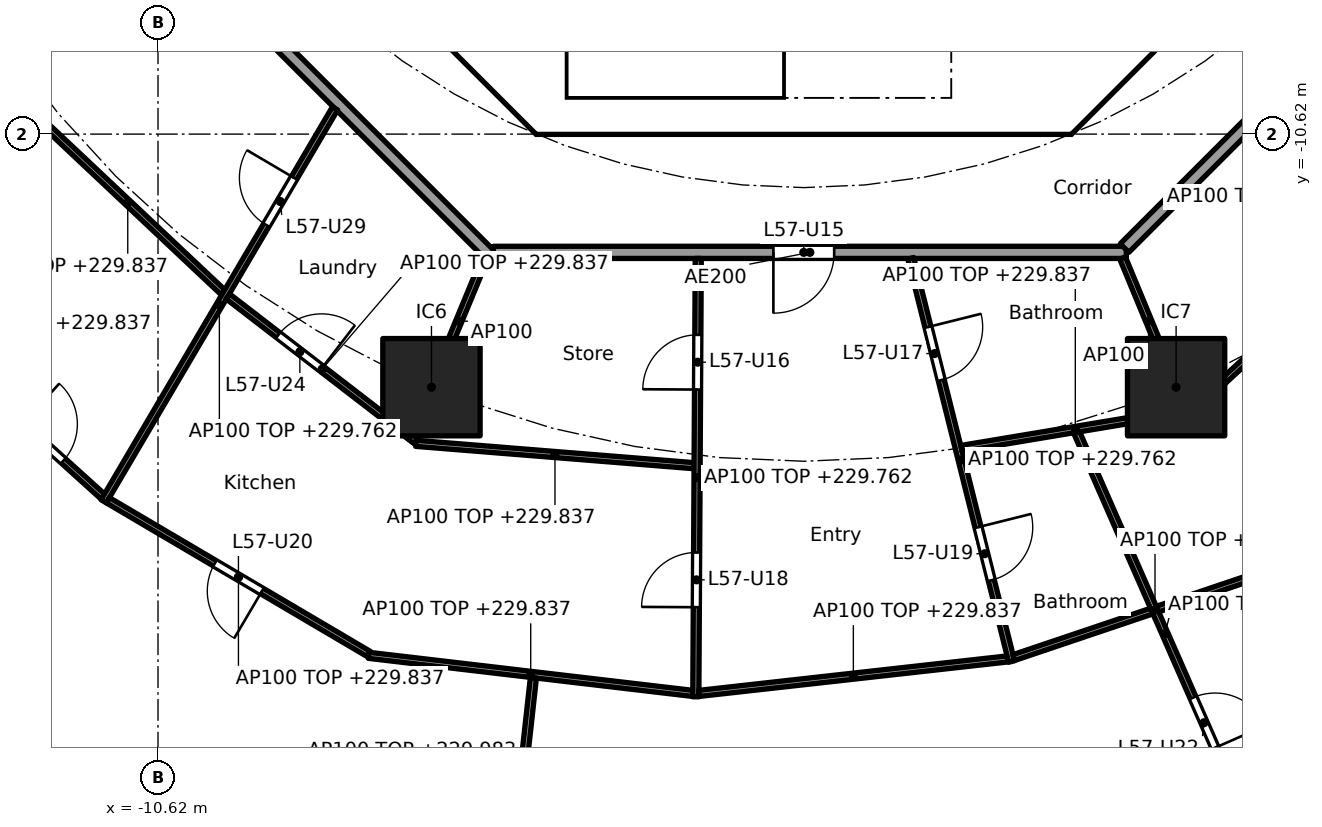
"""IFC4 building model, lengths in metres.
Left out: names, types, materials, properties, quantities, classifications, styles, units other than length and angle.
Written with IfcOpenShell. Run it as: python <this file> out.ifc"""

import sys

from ifc_helpers import new_model, si_unit, direction, frame, frame_2d, origin, origin_2d, place, context, subcontext, project, spatial, polyline, rectangle, outline, extrude, element, fill, save


model = new_model("IFC4")
c1 = context("Model", 3, precision=1e-05, world=origin(), true_north=direction((0.0, 1.0)))
c2 = subcontext(c1, "Body", "Model", "MODEL_VIEW")
j1 = project(units=[si_unit("LENGTHUNIT", "METRE"), si_unit("PLANEANGLEUNIT", "RADIAN")], contexts=[c1])
p1 = place(None, origin())
s1 = spatial("IfcSite", under=j1, at=p1, CompositionType="ELEMENT")
p2 = place(p1, origin())
s2 = spatial("IfcBuilding", under=s1, at=p2, CompositionType="ELEMENT")
p3 = place(p2, frame((0.0, 0.0, 227.0)))
s3 = spatial("IfcBuildingStorey", under=s2, at=p3, CompositionType="ELEMENT", Elevation=227.0)
for number, where, z_axis, x_axis in (
    (1, (-6.123, -14.782, 0.0), (0.0, 0.0, 1.0), (1.0, 0.0, 0.0)),
    (2, (6.123, -14.782, 0.0), (0.0, 0.0, 1.0), (1.0, 0.0, 0.0)),
):
    element("IfcColumn", number, at=place(p3, frame(where, z_axis=z_axis, x_axis=x_axis)), inside=s3, PredefinedType="COLUMN", context=c2, shape_type="SweptSolid", body=[
        extrude(rectangle(XDim=1.6, YDim=1.6, at=origin_2d()), origin(), (0.0, 0.0, 1.0), 3.7),
    ])
p4 = place(p3, frame((-9.988, -4.613, 0.0), z_axis=(0.0, 0.0, 1.0), x_axis=(0.707106781187, -0.707106781187, 0.0)))
e3 = element("IfcWall", 3, at=p4, inside=s3, PredefinedType="SHEAR", context=c2, shape_type="SweptSolid", body=[
    extrude(rectangle(XDim=7.602, YDim=0.6, at=frame_2d((3.801, 0.0))), origin(), (0.0, 0.0, 1.0), 3.44),
])
p5 = place(p4, frame((6.151, 0.0, 0.0)))
e4 = element("IfcOpeningElement", 4, at=p5, cuts=e3, PredefinedType="OPENING", context=c2, shape_type="SweptSolid", body=[
    extrude(rectangle(XDim=1.1, YDim=2.1, at=frame_2d((0.55, 1.05))), frame((0.0, 0.31, 0.0), z_axis=(0.0, -1.0, 0.0), x_axis=(1.0, 0.0, 0.0)), (0.0, 0.0, 1.0), 0.62),
])
p6 = place(p3, frame((4.613, -9.988, 0.0), z_axis=(0.0, 0.0, 1.0), x_axis=(0.707106781187, 0.707106781187, 0.0)))
e5 = element("IfcWall", 5, at=p6, inside=s3, PredefinedType="SHEAR", context=c2, shape_type="SweptSolid", body=[
    extrude(rectangle(XDim=7.602, YDim=0.6, at=frame_2d((3.801, 0.0))), origin(), (0.0, 0.0, 1.0), 3.44),
])
p7 = place(p6, frame((3.201, 0.0, 0.0)))
e6 = element("IfcOpeningElement", 6, at=p7, cuts=e5, PredefinedType="OPENING", context=c2, shape_type="SweptSolid", body=[
    extrude(rectangle(XDim=1.2, YDim=2.1, at=frame_2d((0.6, 1.05))), frame((0.0, 0.31, 0.0), z_axis=(0.0, -1.0, 0.0), x_axis=(1.0, 0.0, 0.0)), (0.0, 0.0, 1.0), 0.62),
])
p8 = place(p3, frame((4.0, -10.025, 0.0), z_axis=(0.0, 0.0, 1.0), x_axis=(0.0, 1.0, 0.0)))
e7 = element("IfcWall", 7, at=p8, inside=s3, PredefinedType="SOLIDWALL", context=c2, shape_type="SweptSolid", body=[
    extrude(rectangle(XDim=3.0, YDim=0.2, at=frame_2d((1.5, 0.0))), origin(), (0.0, 0.0, 1.0), 3.44),
])
p9 = place(p8, frame((0.975, 0.0, 0.0)))
e8 = element("IfcOpeningElement", 8, at=p9, cuts=e7, PredefinedType="OPENING", context=c2, shape_type="SweptSolid", body=[
    extrude(rectangle(XDim=1.1, YDim=2.1, at=frame_2d((0.55, 1.05))), frame((0.0, 0.11, 0.0), z_axis=(0.0, -1.0, 0.0), x_axis=(1.0, 0.0, 0.0)), (0.0, 0.0, 1.0), 0.22),
])
p10 = place(p3, origin())
e9 = element("IfcWall", 9, at=p10, inside=s3, PredefinedType="SHEAR", context=c2, shape_type="SweptSolid", body=[
    extrude(outline(polyline([(-4.152, -10.025), (4.152, -10.025), (4.401, -9.776), (4.825, -10.2), (4.401, -10.625), (-4.401, -10.625), (-4.825, -10.2), (-4.401, -9.776), (-4.152, -10.025)])), origin(), (0.0, 0.0, 1.0), 3.44),
])
p11 = place(p3, origin())
e10 = element("IfcWall", 10, at=p11, inside=s3, PredefinedType="SOLIDWALL", context=c2, shape_type="SweptSolid", body=[
    extrude(outline(polyline([(-3.9, -10.025), (-4.1, -10.025), (-4.1, -7.025), (-3.9, -7.025), (-3.9, -10.025)])), origin(), (0.0, 0.0, 1.0), 3.44),
])
p12 = place(p3, frame((-12.635, -5.134, 0.0), z_axis=(0.0, 0.0, 1.0), x_axis=(0.707106781187, -0.707106781187, 0.0)))
e11 = element("IfcWall", 11, at=p12, inside=s3, PredefinedType="PARTITIONING", context=c2, shape_type="SweptSolid", body=[
    extrude(rectangle(XDim=10.609, YDim=0.2, at=frame_2d((5.305, 0.0))), origin(), (0.0, 0.0, 1.0), 3.44),
])
p13 = place(p3, frame((-5.104, -12.565, 0.0), z_axis=(0.0, 0.0, 1.0), x_axis=(1.0, 0.0, 0.0)))
e12 = element("IfcWall", 12, at=p13, inside=s3, PredefinedType="PARTITIONING", context=c2, shape_type="SweptSolid", body=[
    extrude(rectangle(XDim=10.409, YDim=0.2, at=frame_2d((5.205, 0.0))), origin(), (0.0, 0.0, 1.0), 3.44),
])
p14 = place(p13, frame((4.604, 0.0, 0.0)))
e13 = element("IfcOpeningElement", 13, at=p14, cuts=e12, PredefinedType="OPENING", context=c2, shape_type="SweptSolid", body=[
    extrude(rectangle(XDim=1.0, YDim=2.1, at=frame_2d((0.5, 1.05))), frame((0.0, 0.11, 0.0), z_axis=(0.0, -1.0, 0.0), x_axis=(1.0, 0.0, 0.0)), (0.0, 0.0, 1.0), 0.22),
])
p15 = place(p3, frame((5.275, -12.494, 0.0), z_axis=(0.0, 0.0, 1.0), x_axis=(0.707106781187, 0.707106781187, 0.0)))
e14 = element("IfcWall", 14, at=p15, inside=s3, PredefinedType="PARTITIONING", context=c2, shape_type="SweptSolid", body=[
    extrude(rectangle(XDim=10.409, YDim=0.2, at=frame_2d((5.205, 0.0))), origin(), (0.0, 0.0, 1.0), 3.44),
])
p16 = place(p3, frame((-12.688, -10.27, 0.0), z_axis=(0.0, 0.0, 1.0), x_axis=(0.728268142903, -0.685292282192, 0.0)))
e15 = element("IfcWall", 15, at=p16, inside=s3, PredefinedType="PARTITIONING", context=c2, shape_type="SweptSolid", body=[
    extrude(rectangle(XDim=4.312, YDim=0.1, at=frame_2d((2.156, 0.0))), origin(), (0.0, 0.0, 1.0), 2.837),
])
p17 = place(p3, frame((-15.474, -13.019, 0.0), z_axis=(0.0, 0.0, 1.0), x_axis=(0.742348572616, -0.670013878017, 0.0)))
e16 = element("IfcWall", 16, at=p17, inside=s3, PredefinedType="PARTITIONING", context=c2, shape_type="SweptSolid", body=[
    extrude(rectangle(XDim=5.319, YDim=0.1, at=frame_2d((2.66, 0.0))), origin(), (0.0, 0.0, 1.0), 2.837),
])
p18 = place(p17, frame((3.54, 0.0, 0.0)))
e17 = element("IfcOpeningElement", 17, at=p18, cuts=e16, PredefinedType="OPENING", context=c2, shape_type="SweptSolid", body=[
    extrude(rectangle(XDim=0.9, YDim=2.1, at=frame_2d((0.45, 1.05))), frame((0.0, 0.06, 0.0), z_axis=(0.0, -1.0, 0.0), x_axis=(1.0, 0.0, 0.0)), (0.0, 0.0, 1.0), 0.12),
])
p19 = place(p3, frame((-7.709, -10.198, 0.0), z_axis=(0.0, 0.0, 1.0), x_axis=(-0.507362999545, -0.861732433353, 0.0)))
e18 = element("IfcWall", 18, at=p19, inside=s3, PredefinedType="PARTITIONING", context=c2, shape_type="SweptSolid", body=[
    extrude(rectangle(XDim=7.499, YDim=0.1, at=frame_2d((3.749, 0.0))), origin(), (0.0, 0.0, 1.0), 2.762),
])
p20 = place(p19, frame((1.326, 0.0, 0.0)))
e19 = element("IfcOpeningElement", 19, at=p20, cuts=e18, PredefinedType="OPENING", context=c2, shape_type="SweptSolid", body=[
    extrude(rectangle(XDim=0.9, YDim=2.1, at=frame_2d((0.45, 1.05))), frame((0.0, 0.06, 0.0), z_axis=(0.0, -1.0, 0.0), x_axis=(1.0, 0.0, 0.0)), (0.0, 0.0, 1.0), 0.12),
])
p21 = place(p3, frame((-9.471, -13.289, 0.0), z_axis=(0.0, 0.0, 1.0), x_axis=(0.7922205419, -0.61023488346, 0.0)))
e20 = element("IfcWall", 20, at=p21, inside=s3, PredefinedType="PARTITIONING", context=c2, shape_type="SweptSolid", body=[
    extrude(rectangle(XDim=3.916, YDim=0.1, at=frame_2d((1.958, 0.0))), origin(), (0.0, 0.0, 1.0), 2.837),
])
p22 = place(p21, frame((1.045, 0.0, 0.0)))
e21 = element("IfcOpeningElement", 21, at=p22, cuts=e20, PredefinedType="OPENING", context=c2, shape_type="SweptSolid", body=[
    extrude(rectangle(XDim=0.9, YDim=2.1, at=frame_2d((0.45, 1.05))), frame((0.0, 0.06, 0.0), z_axis=(0.0, -1.0, 0.0), x_axis=(1.0, 0.0, 0.0)), (0.0, 0.0, 1.0), 0.12),
])
p23 = place(p3, frame((-11.445, -16.641, 0.0), z_axis=(0.0, 0.0, 1.0), x_axis=(0.861562560957, -0.507651409489, 0.0)))
e22 = element("IfcWall", 22, at=p23, inside=s3, PredefinedType="PARTITIONING", context=c2, shape_type="SweptSolid", body=[
    extrude(rectangle(XDim=4.985, YDim=0.1, at=frame_2d((2.492, 0.0))), origin(), (0.0, 0.0, 1.0), 2.837),
])
p24 = place(p23, frame((2.042, 0.0, 0.0)))
e23 = element("IfcOpeningElement", 23, at=p24, cuts=e22, PredefinedType="OPENING", context=c2, shape_type="SweptSolid", body=[
    extrude(rectangle(XDim=0.9, YDim=2.1, at=frame_2d((0.45, 1.05))), frame((0.0, 0.06, 0.0), z_axis=(0.0, -1.0, 0.0), x_axis=(1.0, 0.0, 0.0)), (0.0, 0.0, 1.0), 0.12),
])
p25 = place(p3, frame((-5.243, -12.657, 0.0), z_axis=(0.0, 0.0, 1.0), x_axis=(-0.382719158442, -0.923864733477, 0.0)))
e24 = element("IfcWall", 24, at=p25, inside=s3, PredefinedType="PARTITIONING", context=c2, shape_type="SweptSolid", body=[
    extrude(rectangle(XDim=2.25, YDim=0.1, at=frame_2d((1.125, 0.0))), origin(), (0.0, 0.0, 1.0), 3.44),
])
p26 = place(p3, frame((-6.379, -15.705, 0.0), z_axis=(0.0, 0.0, 1.0), x_axis=(0.996786462227, -0.080104611105, 0.0)))
e25 = element("IfcWall", 25, at=p26, inside=s3, PredefinedType="PARTITIONING", context=c2, shape_type="SweptSolid", body=[
    extrude(rectangle(XDim=4.59, YDim=0.1, at=frame_2d((2.295, 0.0))), origin(), (0.0, 0.0, 1.0), 2.837),
])
p27 = place(p3, frame((-7.156, -19.191, 0.0), z_axis=(0.0, 0.0, 1.0), x_axis=(0.993172627718, -0.116653896424, 0.0)))
e26 = element("IfcWall", 26, at=p27, inside=s3, PredefinedType="PARTITIONING", context=c2, shape_type="SweptSolid", body=[
    extrude(rectangle(XDim=5.368, YDim=0.1, at=frame_2d((2.684, 0.0))), origin(), (0.0, 0.0, 1.0), 2.837),
])
p28 = place(p3, frame((-4.447, -19.56, 0.0), z_axis=(0.0, 0.0, 1.0), x_axis=(-0.109897425445, -0.993942933915, 0.0)))
e27 = element("IfcWall", 27, at=p28, inside=s3, PredefinedType="PARTITIONING", context=c2, shape_type="SweptSolid", body=[
    extrude(rectangle(XDim=4.465, YDim=0.1, at=frame_2d((2.233, 0.0))), origin(), (0.0, 0.0, 1.0), 2.983),
])
p29 = place(p28, frame((1.783, 0.0, 0.0)))
e28 = element("IfcOpeningElement", 28, at=p29, cuts=e27, PredefinedType="OPENING", context=c2, shape_type="SweptSolid", body=[
    extrude(rectangle(XDim=0.9, YDim=2.1, at=frame_2d((0.45, 1.05))), frame((0.0, 0.06, 0.0), z_axis=(0.0, -1.0, 0.0), x_axis=(1.0, 0.0, 0.0)), (0.0, 0.0, 1.0), 0.12),
])
p30 = place(p3, frame((-1.735, -12.665, 0.0), z_axis=(0.0, 0.0, 1.0), x_axis=(-0.005554152823, -0.999984575574, 0.0)))
e29 = element("IfcWall", 29, at=p30, inside=s3, PredefinedType="PARTITIONING", context=c2, shape_type="SweptSolid", body=[
    extrude(rectangle(XDim=7.209, YDim=0.1, at=frame_2d((3.604, 0.0))), origin(), (0.0, 0.0, 1.0), 2.762),
])
p31 = place(p30, frame((1.256, 0.0, 0.0)))
e30 = element("IfcOpeningElement", 30, at=p31, cuts=e29, PredefinedType="OPENING", context=c2, shape_type="SweptSolid", body=[
    extrude(rectangle(XDim=0.9, YDim=2.1, at=frame_2d((0.45, 1.05))), frame((0.0, 0.06, 0.0), z_axis=(0.0, -1.0, 0.0), x_axis=(1.0, 0.0, 0.0)), (0.0, 0.0, 1.0), 0.12),
])
p32 = place(p30, frame((4.836, 0.0, 0.0)))
e31 = element("IfcOpeningElement", 31, at=p32, cuts=e29, PredefinedType="OPENING", context=c2, shape_type="SweptSolid", body=[
    extrude(rectangle(XDim=0.9, YDim=2.1, at=frame_2d((0.45, 1.05))), frame((0.0, 0.06, 0.0), z_axis=(0.0, -1.0, 0.0), x_axis=(1.0, 0.0, 0.0)), (0.0, 0.0, 1.0), 0.12),
])
p33 = place(p3, frame((-1.726, -19.818, 0.0), z_axis=(0.0, 0.0, 1.0), x_axis=(0.99381893047, 0.111013212902, 0.0)))
e32 = element("IfcWall", 32, at=p33, inside=s3, PredefinedType="PARTITIONING", context=c2, shape_type="SweptSolid", body=[
    extrude(rectangle(XDim=5.113, YDim=0.1, at=frame_2d((2.557, 0.0))), origin(), (0.0, 0.0, 1.0), 2.837),
])
p34 = place(p3, frame((1.759, -12.662, 0.0), z_axis=(0.0, 0.0, 1.0), x_axis=(0.242653275363, -0.970113079984, 0.0)))
e33 = element("IfcWall", 33, at=p34, inside=s3, PredefinedType="PARTITIONING", context=c2, shape_type="SweptSolid", body=[
    extrude(rectangle(XDim=6.836, YDim=0.1, at=frame_2d((3.418, 0.0))), origin(), (0.0, 0.0, 1.0), 2.762),
])
p35 = place(p34, frame((1.166, 0.0, 0.0)))
e34 = element("IfcOpeningElement", 34, at=p35, cuts=e33, PredefinedType="OPENING", context=c2, shape_type="SweptSolid", body=[
    extrude(rectangle(XDim=0.9, YDim=2.1, at=frame_2d((0.45, 1.05))), frame((0.0, 0.06, 0.0), z_axis=(0.0, -1.0, 0.0), x_axis=(1.0, 0.0, 0.0)), (0.0, 0.0, 1.0), 0.12),
])
p36 = place(p34, frame((4.559, 0.0, 0.0)))
e35 = element("IfcOpeningElement", 35, at=p36, cuts=e33, PredefinedType="OPENING", context=c2, shape_type="SweptSolid", body=[
    extrude(rectangle(XDim=0.9, YDim=2.1, at=frame_2d((0.45, 1.05))), frame((0.0, 0.06, 0.0), z_axis=(0.0, -1.0, 0.0), x_axis=(1.0, 0.0, 0.0)), (0.0, 0.0, 1.0), 0.12),
])
p37 = place(p3, frame((2.593, -15.789, 0.0), z_axis=(0.0, 0.0, 1.0), x_axis=(0.986381756816, 0.164471972749, 0.0)))
e36 = element("IfcWall", 36, at=p37, inside=s3, PredefinedType="PARTITIONING", context=c2, shape_type="SweptSolid", body=[
    extrude(rectangle(XDim=3.797, YDim=0.1, at=frame_2d((1.898, 0.0))), origin(), (0.0, 0.0, 1.0), 2.837),
])
p38 = place(p3, frame((3.453, -19.229, 0.0), z_axis=(0.0, 0.0, 1.0), x_axis=(0.947572025416, 0.319542261133, 0.0)))
e37 = element("IfcWall", 37, at=p38, inside=s3, PredefinedType="PARTITIONING", context=c2, shape_type="SweptSolid", body=[
    extrude(rectangle(XDim=4.903, YDim=0.1, at=frame_2d((2.451, 0.0))), origin(), (0.0, 0.0, 1.0), 2.837),
])
p39 = place(p3, frame((4.485, -15.522, 0.0), z_axis=(0.0, 0.0, 1.0), x_axis=(0.401959715825, -0.915657352318, 0.0)))
e38 = element("IfcWall", 38, at=p39, inside=s3, PredefinedType="PARTITIONING", context=c2, shape_type="SweptSolid", body=[
    extrude(rectangle(XDim=7.239, YDim=0.1, at=frame_2d((3.619, 0.0))), origin(), (0.0, 0.0, 1.0), 2.983),
])
p40 = place(p39, frame((4.767, 0.0, 0.0)))
e39 = element("IfcOpeningElement", 39, at=p40, cuts=e38, PredefinedType="OPENING", context=c2, shape_type="SweptSolid", body=[
    extrude(rectangle(XDim=0.9, YDim=2.1, at=frame_2d((0.45, 1.05))), frame((0.0, 0.06, 0.0), z_axis=(0.0, -1.0, 0.0), x_axis=(1.0, 0.0, 0.0)), (0.0, 0.0, 1.0), 0.12),
])
p41 = place(p3, frame((5.243, -12.657, 0.0), z_axis=(0.0, 0.0, 1.0), x_axis=(0.382719158442, -0.923864733477, 0.0)))
e40 = element("IfcWall", 40, at=p41, inside=s3, PredefinedType="PARTITIONING", context=c2, shape_type="SweptSolid", body=[
    extrude(rectangle(XDim=2.25, YDim=0.1, at=frame_2d((1.125, 0.0))), origin(), (0.0, 0.0, 1.0), 3.44),
])
p42 = place(p3, frame((6.351, -15.19, 0.0), z_axis=(0.0, 0.0, 1.0), x_axis=(0.73462674599, 0.678471476243, 0.0)))
e41 = element("IfcWall", 41, at=p42, inside=s3, PredefinedType="PARTITIONING", context=c2, shape_type="SweptSolid", body=[
    extrude(rectangle(XDim=5.987, YDim=0.1, at=frame_2d((2.993, 0.0))), origin(), (0.0, 0.0, 1.0), 2.837),
])
p43 = place(p42, frame((2.568, 0.0, 0.0)))
e42 = element("IfcOpeningElement", 42, at=p43, cuts=e41, PredefinedType="OPENING", context=c2, shape_type="SweptSolid", body=[
    extrude(rectangle(XDim=0.9, YDim=2.1, at=frame_2d((0.45, 1.05))), frame((0.0, 0.06, 0.0), z_axis=(0.0, -1.0, 0.0), x_axis=(1.0, 0.0, 0.0)), (0.0, 0.0, 1.0), 0.12),
])
p44 = place(p5, origin())
e43 = element("IfcDoor", 43, at=p44, inside=s3, OperationType="SINGLE_SWING_LEFT", PredefinedType="DOOR", context=c2, shape_type="SweptSolid", body=[
    extrude(rectangle(XDim=1.1, YDim=2.1, at=frame_2d((0.55, 1.05))), frame((0.0, 0.025, 0.0), z_axis=(0.0, -1.0, 0.0), x_axis=(1.0, 0.0, 0.0)), (0.0, 0.0, 1.0), 0.05),
])
fill(e4, e43)
p45 = place(p14, frame((1.0, 0.0, 0.0), x_axis=(-1.0, 0.0, 0.0)))
e44 = element("IfcDoor", 44, at=p45, inside=s3, OperationType="SINGLE_SWING_RIGHT", PredefinedType="DOOR", context=c2, shape_type="SweptSolid", body=[
    extrude(rectangle(XDim=1.0, YDim=2.1, at=frame_2d((0.5, 1.05))), frame((0.0, 0.025, 0.0), z_axis=(0.0, -1.0, 0.0), x_axis=(1.0, 0.0, 0.0)), (0.0, 0.0, 1.0), 0.05),
])
fill(e13, e44)
p46 = place(p31, frame((0.9, 0.0, 0.0), x_axis=(-1.0, 0.0, 0.0)))
e45 = element("IfcDoor", 45, at=p46, inside=s3, OperationType="SINGLE_SWING_LEFT", PredefinedType="DOOR", context=c2, shape_type="SweptSolid", body=[
    extrude(rectangle(XDim=0.9, YDim=2.1, at=frame_2d((0.45, 1.05))), frame((0.0, 0.025, 0.0), z_axis=(0.0, -1.0, 0.0), x_axis=(1.0, 0.0, 0.0)), (0.0, 0.0, 1.0), 0.05),
])
fill(e30, e45)
p47 = place(p35, origin())
e46 = element("IfcDoor", 46, at=p47, inside=s3, OperationType="SINGLE_SWING_LEFT", PredefinedType="DOOR", context=c2, shape_type="SweptSolid", body=[
    extrude(rectangle(XDim=0.9, YDim=2.1, at=frame_2d((0.45, 1.05))), frame((0.0, 0.025, 0.0), z_axis=(0.0, -1.0, 0.0), x_axis=(1.0, 0.0, 0.0)), (0.0, 0.0, 1.0), 0.05),
])
fill(e34, e46)
p48 = place(p32, frame((0.9, 0.0, 0.0), x_axis=(-1.0, 0.0, 0.0)))
e47 = element("IfcDoor", 47, at=p48, inside=s3, OperationType="SINGLE_SWING_LEFT", PredefinedType="DOOR", context=c2, shape_type="SweptSolid", body=[
    extrude(rectangle(XDim=0.9, YDim=2.1, at=frame_2d((0.45, 1.05))), frame((0.0, 0.025, 0.0), z_axis=(0.0, -1.0, 0.0), x_axis=(1.0, 0.0, 0.0)), (0.0, 0.0, 1.0), 0.05),
])
fill(e31, e47)
p49 = place(p36, origin())
e48 = element("IfcDoor", 48, at=p49, inside=s3, OperationType="SINGLE_SWING_LEFT", PredefinedType="DOOR", context=c2, shape_type="SweptSolid", body=[
    extrude(rectangle(XDim=0.9, YDim=2.1, at=frame_2d((0.45, 1.05))), frame((0.0, 0.025, 0.0), z_axis=(0.0, -1.0, 0.0), x_axis=(1.0, 0.0, 0.0)), (0.0, 0.0, 1.0), 0.05),
])
fill(e35, e48)
p50 = place(p24, frame((0.9, 0.0, 0.0), x_axis=(-1.0, 0.0, 0.0)))
e49 = element("IfcDoor", 49, at=p50, inside=s3, OperationType="SINGLE_SWING_LEFT", PredefinedType="DOOR", context=c2, shape_type="SweptSolid", body=[
    extrude(rectangle(XDim=0.9, YDim=2.1, at=frame_2d((0.45, 1.05))), frame((0.0, 0.025, 0.0), z_axis=(0.0, -1.0, 0.0), x_axis=(1.0, 0.0, 0.0)), (0.0, 0.0, 1.0), 0.05),
])
fill(e23, e49)
p51 = place(p40, origin())
e50 = element("IfcDoor", 50, at=p51, inside=s3, OperationType="SINGLE_SWING_RIGHT", PredefinedType="DOOR", context=c2, shape_type="SweptSolid", body=[
    extrude(rectangle(XDim=0.9, YDim=2.1, at=frame_2d((0.45, 1.05))), frame((0.0, 0.025, 0.0), z_axis=(0.0, -1.0, 0.0), x_axis=(1.0, 0.0, 0.0)), (0.0, 0.0, 1.0), 0.05),
])
fill(e39, e50)
p52 = place(p22, origin())
e51 = element("IfcDoor", 51, at=p52, inside=s3, OperationType="SINGLE_SWING_RIGHT", PredefinedType="DOOR", context=c2, shape_type="SweptSolid", body=[
    extrude(rectangle(XDim=0.9, YDim=2.1, at=frame_2d((0.45, 1.05))), frame((0.0, 0.025, 0.0), z_axis=(0.0, -1.0, 0.0), x_axis=(1.0, 0.0, 0.0)), (0.0, 0.0, 1.0), 0.05),
])
fill(e21, e51)
p53 = place(p18, origin())
e52 = element("IfcDoor", 52, at=p53, inside=s3, OperationType="SINGLE_SWING_LEFT", PredefinedType="DOOR", context=c2, shape_type="SweptSolid", body=[
    extrude(rectangle(XDim=0.9, YDim=2.1, at=frame_2d((0.45, 1.05))), frame((0.0, 0.025, 0.0), z_axis=(0.0, -1.0, 0.0), x_axis=(1.0, 0.0, 0.0)), (0.0, 0.0, 1.0), 0.05),
])
fill(e17, e52)
p54 = place(p20, frame((0.9, 0.0, 0.0), x_axis=(-1.0, 0.0, 0.0)))
e53 = element("IfcDoor", 53, at=p54, inside=s3, OperationType="SINGLE_SWING_RIGHT", PredefinedType="DOOR", context=c2, shape_type="SweptSolid", body=[
    extrude(rectangle(XDim=0.9, YDim=2.1, at=frame_2d((0.45, 1.05))), frame((0.0, 0.025, 0.0), z_axis=(0.0, -1.0, 0.0), x_axis=(1.0, 0.0, 0.0)), (0.0, 0.0, 1.0), 0.05),
])
fill(e19, e53)
save(model, sys.argv[1])
